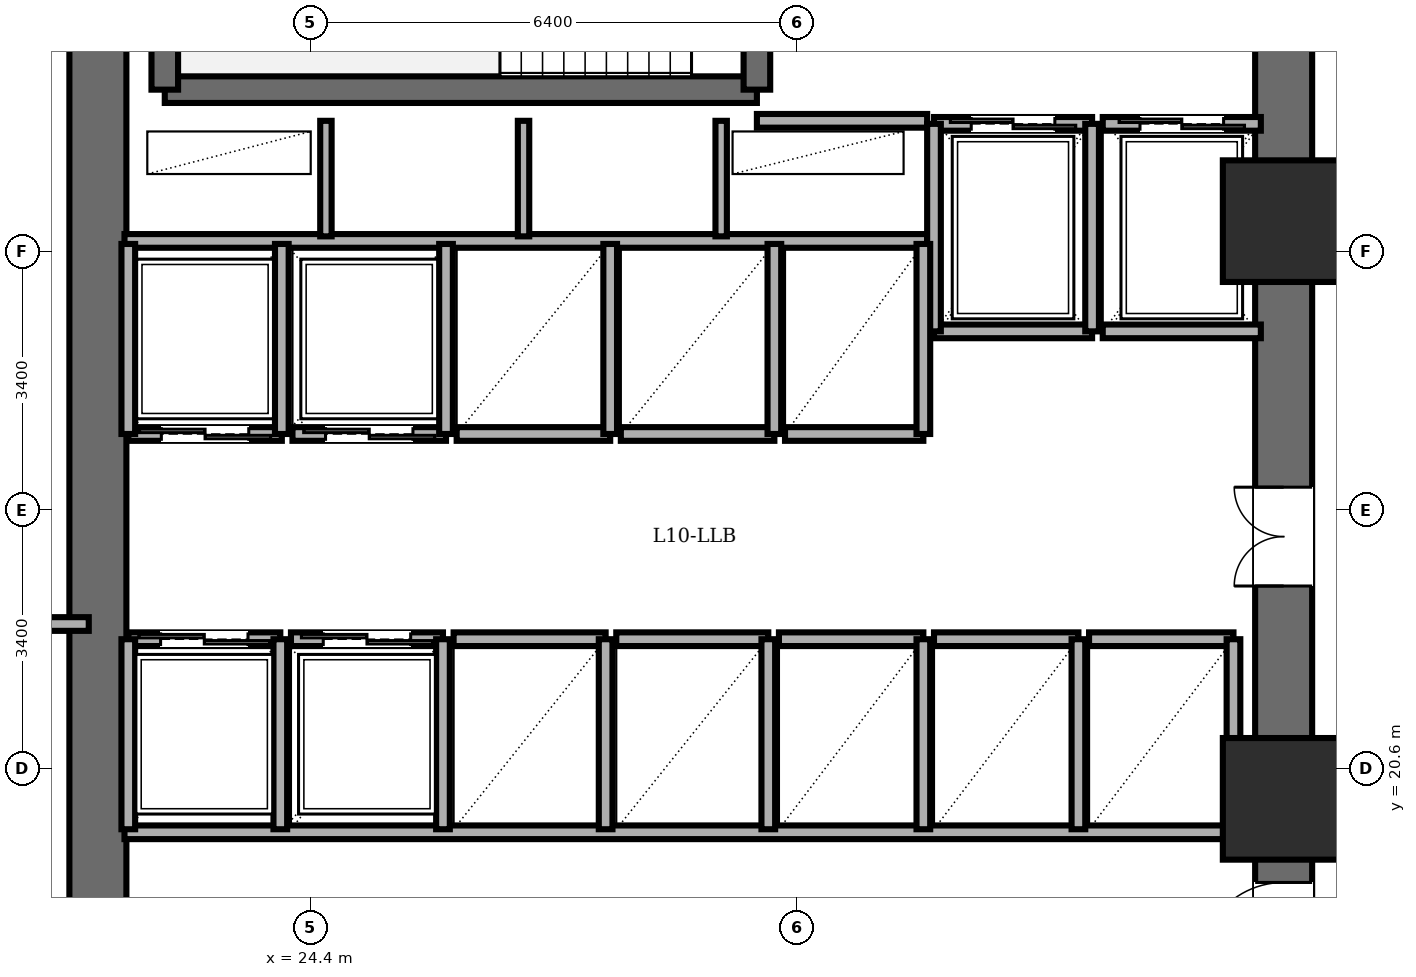
"""IFC4 building model, lengths in metres.
Left out: names, types, materials, properties, quantities, classifications, styles, units other than length and angle.
Written with IfcOpenShell. Run it as: python <this file> out.ifc"""

import sys

from ifc_helpers import new_model, si_unit, direction, frame, frame_2d, origin, origin_2d, place, context, subcontext, project, spatial, rectangle, extrude, element, fill, save


model = new_model("IFC4")
c1 = context("Model", 3, precision=1e-05, world=origin(), true_north=direction((0.0, 1.0)))
c2 = subcontext(c1, "Body", "Model", "MODEL_VIEW")
j1 = project(units=[si_unit("LENGTHUNIT", "METRE"), si_unit("PLANEANGLEUNIT", "RADIAN")], contexts=[c1])
p1 = place(None, origin())
s1 = spatial("IfcSite", under=j1, at=p1, CompositionType="ELEMENT")
p2 = place(p1, origin())
s2 = spatial("IfcBuilding", under=s1, at=p2, CompositionType="ELEMENT")
p3 = place(p2, frame((0.0, 0.0, 39.6)))
s3 = spatial("IfcBuildingStorey", under=s2, at=p3, CompositionType="ELEMENT", Elevation=39.6)
for number, where, z_axis, x_axis in (
    (1, (37.2, 20.2, 0.0), (0.0, 0.0, 1.0), (1.0, 0.0, 0.0)),
    (2, (37.2, 27.8, 0.0), (0.0, 0.0, 1.0), (1.0, 0.0, 0.0)),
):
    element("IfcColumn", number, at=place(p3, frame(where, z_axis=z_axis, x_axis=x_axis)), inside=s3, PredefinedType="COLUMN", context=c2, shape_type="SweptSolid", body=[
        extrude(rectangle(XDim=1.6, YDim=1.6, at=origin_2d()), origin(), (0.0, 0.0, 1.0), 3.6),
    ])
p4 = place(p3, frame((21.6, 14.4, 0.0), z_axis=(0.0, 0.0, 1.0), x_axis=(0.0, 1.0, 0.0)))
e3 = element("IfcWall", 3, at=p4, inside=s3, PredefinedType="SHEAR", context=c2, shape_type="SweptSolid", body=[
    extrude(rectangle(XDim=19.2, YDim=0.75, at=frame_2d((9.6, 0.0))), origin(), (0.0, 0.0, 1.0), 3.4),
])
p5 = place(p3, frame((37.2, 14.4, 0.0), z_axis=(0.0, 0.0, 1.0), x_axis=(0.0, 1.0, 0.0)))
e4 = element("IfcWall", 4, at=p5, inside=s3, PredefinedType="SHEAR", context=c2, shape_type="SweptSolid", body=[
    extrude(rectangle(XDim=19.2, YDim=0.75, at=frame_2d((9.6, 0.0))), origin(), (0.0, 0.0, 1.0), 3.4),
])
p6 = place(p5, frame((15.8, 0.0, 0.0)))
e5 = element("IfcOpeningElement", 5, at=p6, cuts=e4, PredefinedType="OPENING", context=c2, shape_type="SweptSolid", body=[
    extrude(rectangle(XDim=1.15, YDim=2.15, at=frame_2d((0.575, 1.075))), frame((0.0, 0.385, 0.0), z_axis=(0.0, -1.0, 0.0), x_axis=(1.0, 0.0, 0.0)), (0.0, 0.0, 1.0), 0.77),
])
p7 = place(p5, frame((3.6, 0.0, 0.0)))
e6 = element("IfcOpeningElement", 6, at=p7, cuts=e4, PredefinedType="OPENING", context=c2, shape_type="SweptSolid", body=[
    extrude(rectangle(XDim=1.1, YDim=2.15, at=frame_2d((0.55, 1.075))), frame((0.0, 0.385, 0.0), z_axis=(0.0, -1.0, 0.0), x_axis=(1.0, 0.0, 0.0)), (0.0, 0.0, 1.0), 0.77),
])
p8 = place(p5, frame((8.6, 0.0, 0.0)))
e7 = element("IfcOpeningElement", 7, at=p8, cuts=e4, PredefinedType="OPENING", context=c2, shape_type="SweptSolid", body=[
    extrude(rectangle(XDim=1.3, YDim=2.2, at=frame_2d((0.65, 1.1))), frame((0.0, 0.385, 0.0), z_axis=(0.0, -1.0, 0.0), x_axis=(1.0, 0.0, 0.0)), (0.0, 0.0, 1.0), 0.77),
])
p9 = place(p3, frame((22.48, 29.53, 0.0), z_axis=(0.0, 0.0, 1.0), x_axis=(1.0, 0.0, 0.0)))
e8 = element("IfcWall", 8, at=p9, inside=s3, PredefinedType="SOLIDWALL", context=c2, shape_type="SweptSolid", body=[
    extrude(rectangle(XDim=7.79, YDim=0.35, at=frame_2d((3.895, 0.0))), origin(), (0.0, 0.0, 1.0), 3.4),
])
p10 = place(p3, frame((22.48, 29.53, 0.0), z_axis=(0.0, 0.0, 1.0), x_axis=(0.0, 1.0, 0.0)))
e9 = element("IfcWall", 9, at=p10, inside=s3, PredefinedType="SOLIDWALL", context=c2, shape_type="SweptSolid", body=[
    extrude(rectangle(XDim=3.58, YDim=0.35, at=frame_2d((1.79, 0.0))), origin(), (0.0, 0.0, 1.0), 3.4),
])
p11 = place(p3, frame((30.27, 29.53, 0.0), z_axis=(0.0, 0.0, 1.0), x_axis=(0.0, 1.0, 0.0)))
e10 = element("IfcWall", 10, at=p11, inside=s3, PredefinedType="SOLIDWALL", context=c2, shape_type="SweptSolid", body=[
    extrude(rectangle(XDim=3.58, YDim=0.35, at=frame_2d((1.79, 0.0))), origin(), (0.0, 0.0, 1.0), 3.4),
])
p12 = place(p11, frame((1.25, 0.0, 0.0)))
e11 = element("IfcOpeningElement", 11, at=p12, cuts=e10, PredefinedType="OPENING", context=c2, shape_type="SweptSolid", body=[
    extrude(rectangle(XDim=1.1, YDim=2.15, at=frame_2d((0.55, 1.075))), frame((0.0, 0.185, 0.0), z_axis=(0.0, -1.0, 0.0), x_axis=(1.0, 0.0, 0.0)), (0.0, 0.0, 1.0), 0.37),
])
p13 = place(p3, frame((30.27, 29.12, 0.0), z_axis=(0.0, 0.0, 1.0), x_axis=(1.0, 0.0, 0.0)))
e12 = element("IfcWall", 12, at=p13, inside=s3, PredefinedType="PARTITIONING", context=c2, shape_type="SweptSolid", body=[
    extrude(rectangle(XDim=2.24, YDim=0.18, at=frame_2d((1.12, 0.0))), origin(), (0.0, 0.0, 1.0), 3.4),
])
p14 = place(p3, frame((21.95, 27.54, 0.0), z_axis=(0.0, 0.0, 1.0), x_axis=(1.0, 0.0, 0.0)))
e13 = element("IfcWall", 13, at=p14, inside=s3, PredefinedType="PARTITIONING", context=c2, shape_type="SweptSolid", body=[
    extrude(rectangle(XDim=10.56, YDim=0.18, at=frame_2d((5.28, 0.0))), origin(), (0.0, 0.0, 1.0), 3.4),
])
for number, where, z_axis, x_axis in (
    (14, (24.6, 27.6, 0.0), (0.0, 0.0, 1.0), (0.0, 1.0, 0.0)),
    (15, (27.2, 27.6, 0.0), (0.0, 0.0, 1.0), (0.0, 1.0, 0.0)),
    (16, (29.8, 27.6, 0.0), (0.0, 0.0, 1.0), (0.0, 1.0, 0.0)),
):
    element("IfcWall", number, at=place(p3, frame(where, z_axis=z_axis, x_axis=x_axis)), inside=s3, PredefinedType="PARTITIONING", context=c2, shape_type="SweptSolid", body=[
        extrude(rectangle(XDim=1.52, YDim=0.15, at=frame_2d((0.76, 0.0))), origin(), (0.0, 0.0, 1.0), 3.4),
    ])
p15 = place(p3, frame((21.95, 19.76, 0.0), z_axis=(0.0, 0.0, 1.0), x_axis=(1.0, 0.0, 0.0)))
e17 = element("IfcWall", 17, at=p15, inside=s3, PredefinedType="PARTITIONING", context=c2, shape_type="SweptSolid", body=[
    extrude(rectangle(XDim=14.87, YDim=0.18, at=frame_2d((7.435, 0.0))), origin(), (0.0, 0.0, 1.0), 3.4),
])
p16 = place(p3, frame((32.6, 29.08, 0.0), z_axis=(0.0, 0.0, 1.0), x_axis=(1.0, 0.0, 0.0)))
e18 = element("IfcWall", 18, at=p16, inside=s3, PredefinedType="PARTITIONING", context=c2, shape_type="SweptSolid", body=[
    extrude(rectangle(XDim=2.08, YDim=0.18, at=frame_2d((1.04, 0.0))), origin(), (0.0, 0.0, 1.0), 3.4),
])
p17 = place(p16, frame((0.49, 0.0, 0.0)))
e19 = element("IfcOpeningElement", 19, at=p17, cuts=e18, PredefinedType="OPENING", context=c2, shape_type="SweptSolid", body=[
    extrude(rectangle(XDim=1.1, YDim=2.2, at=frame_2d((0.55, 1.1))), frame((0.0, 0.1, 0.0), z_axis=(0.0, -1.0, 0.0), x_axis=(1.0, 0.0, 0.0)), (0.0, 0.0, 1.0), 0.2),
])
p18 = place(p3, frame((34.68, 26.35, 0.0), z_axis=(0.0, 0.0, 1.0), x_axis=(-1.0, 0.0, 0.0)))
e20 = element("IfcWall", 20, at=p18, inside=s3, PredefinedType="PARTITIONING", context=c2, shape_type="SweptSolid", body=[
    extrude(rectangle(XDim=2.08, YDim=0.18, at=frame_2d((1.04, 0.0))), origin(), (0.0, 0.0, 1.0), 3.4),
])
for number, where, z_axis, x_axis in (
    (21, (34.68, 26.35, 0.0), (0.0, 0.0, 1.0), (0.0, 1.0, 0.0)),
    (22, (32.6, 29.08, 0.0), (0.0, 0.0, 1.0), (0.0, -1.0, 0.0)),
):
    element("IfcWall", number, at=place(p3, frame(where, z_axis=z_axis, x_axis=x_axis)), inside=s3, PredefinedType="PARTITIONING", context=c2, shape_type="SweptSolid", body=[
        extrude(rectangle(XDim=2.73, YDim=0.18, at=frame_2d((1.365, 0.0))), origin(), (0.0, 0.0, 1.0), 3.4),
    ])
p19 = place(p3, frame((34.82, 29.08, 0.0), z_axis=(0.0, 0.0, 1.0), x_axis=(1.0, 0.0, 0.0)))
e23 = element("IfcWall", 23, at=p19, inside=s3, PredefinedType="PARTITIONING", context=c2, shape_type="SweptSolid", body=[
    extrude(rectangle(XDim=2.08, YDim=0.18, at=frame_2d((1.04, 0.0))), origin(), (0.0, 0.0, 1.0), 3.4),
])
p20 = place(p19, frame((0.49, 0.0, 0.0)))
e24 = element("IfcOpeningElement", 24, at=p20, cuts=e23, PredefinedType="OPENING", context=c2, shape_type="SweptSolid", body=[
    extrude(rectangle(XDim=1.1, YDim=2.2, at=frame_2d((0.55, 1.1))), frame((0.0, 0.1, 0.0), z_axis=(0.0, -1.0, 0.0), x_axis=(1.0, 0.0, 0.0)), (0.0, 0.0, 1.0), 0.2),
])
p21 = place(p3, frame((36.9, 26.35, 0.0), z_axis=(0.0, 0.0, 1.0), x_axis=(-1.0, 0.0, 0.0)))
e25 = element("IfcWall", 25, at=p21, inside=s3, PredefinedType="PARTITIONING", context=c2, shape_type="SweptSolid", body=[
    extrude(rectangle(XDim=2.08, YDim=0.18, at=frame_2d((1.04, 0.0))), origin(), (0.0, 0.0, 1.0), 3.4),
])
p22 = place(p3, frame((24.02, 25.0, 0.0), z_axis=(0.0, 0.0, 1.0), x_axis=(-1.0, 0.0, 0.0)))
e26 = element("IfcWall", 26, at=p22, inside=s3, PredefinedType="PARTITIONING", context=c2, shape_type="SweptSolid", body=[
    extrude(rectangle(XDim=2.02, YDim=0.18, at=frame_2d((1.01, 0.0))), origin(), (0.0, 0.0, 1.0), 3.4),
])
p23 = place(p22, frame((0.435, 0.0, 0.0)))
e27 = element("IfcOpeningElement", 27, at=p23, cuts=e26, PredefinedType="OPENING", context=c2, shape_type="SweptSolid", body=[
    extrude(rectangle(XDim=1.15, YDim=2.2, at=frame_2d((0.575, 1.1))), frame((0.0, 0.1, 0.0), z_axis=(0.0, -1.0, 0.0), x_axis=(1.0, 0.0, 0.0)), (0.0, 0.0, 1.0), 0.2),
])
for number, where, z_axis, x_axis in (
    (28, (24.02, 25.0, 0.0), (0.0, 0.0, 1.0), (0.0, 1.0, 0.0)),
    (29, (22.0, 27.5, 0.0), (0.0, 0.0, 1.0), (0.0, -1.0, 0.0)),
):
    element("IfcWall", number, at=place(p3, frame(where, z_axis=z_axis, x_axis=x_axis)), inside=s3, PredefinedType="PARTITIONING", context=c2, shape_type="SweptSolid", body=[
        extrude(rectangle(XDim=2.5, YDim=0.18, at=frame_2d((1.25, 0.0))), origin(), (0.0, 0.0, 1.0), 3.4),
    ])
p24 = place(p3, frame((26.18, 25.0, 0.0), z_axis=(0.0, 0.0, 1.0), x_axis=(-1.0, 0.0, 0.0)))
e30 = element("IfcWall", 30, at=p24, inside=s3, PredefinedType="PARTITIONING", context=c2, shape_type="SweptSolid", body=[
    extrude(rectangle(XDim=2.02, YDim=0.18, at=frame_2d((1.01, 0.0))), origin(), (0.0, 0.0, 1.0), 3.4),
])
p25 = place(p24, frame((0.435, 0.0, 0.0)))
e31 = element("IfcOpeningElement", 31, at=p25, cuts=e30, PredefinedType="OPENING", context=c2, shape_type="SweptSolid", body=[
    extrude(rectangle(XDim=1.15, YDim=2.2, at=frame_2d((0.575, 1.1))), frame((0.0, 0.1, 0.0), z_axis=(0.0, -1.0, 0.0), x_axis=(1.0, 0.0, 0.0)), (0.0, 0.0, 1.0), 0.2),
])
p26 = place(p3, frame((26.18, 25.0, 0.0), z_axis=(0.0, 0.0, 1.0), x_axis=(0.0, 1.0, 0.0)))
e32 = element("IfcWall", 32, at=p26, inside=s3, PredefinedType="PARTITIONING", context=c2, shape_type="SweptSolid", body=[
    extrude(rectangle(XDim=2.5, YDim=0.18, at=frame_2d((1.25, 0.0))), origin(), (0.0, 0.0, 1.0), 3.4),
])
p27 = place(p3, frame((22.0, 22.3, 0.0), z_axis=(0.0, 0.0, 1.0), x_axis=(1.0, 0.0, 0.0)))
e33 = element("IfcWall", 33, at=p27, inside=s3, PredefinedType="PARTITIONING", context=c2, shape_type="SweptSolid", body=[
    extrude(rectangle(XDim=2.0, YDim=0.18, at=frame_2d((1.0, 0.0))), origin(), (0.0, 0.0, 1.0), 3.4),
])
p28 = place(p27, frame((0.425, 0.0, 0.0)))
e34 = element("IfcOpeningElement", 34, at=p28, cuts=e33, PredefinedType="OPENING", context=c2, shape_type="SweptSolid", body=[
    extrude(rectangle(XDim=1.15, YDim=2.2, at=frame_2d((0.575, 1.1))), frame((0.0, 0.1, 0.0), z_axis=(0.0, -1.0, 0.0), x_axis=(1.0, 0.0, 0.0)), (0.0, 0.0, 1.0), 0.2),
])
for number, where, z_axis, x_axis in (
    (35, (24.0, 19.8, 0.0), (0.0, 0.0, 1.0), (0.0, 1.0, 0.0)),
    (36, (22.0, 22.3, 0.0), (0.0, 0.0, 1.0), (0.0, -1.0, 0.0)),
):
    element("IfcWall", number, at=place(p3, frame(where, z_axis=z_axis, x_axis=x_axis)), inside=s3, PredefinedType="PARTITIONING", context=c2, shape_type="SweptSolid", body=[
        extrude(rectangle(XDim=2.5, YDim=0.18, at=frame_2d((1.25, 0.0))), origin(), (0.0, 0.0, 1.0), 3.4),
    ])
p29 = place(p3, frame((24.14, 22.3, 0.0), z_axis=(0.0, 0.0, 1.0), x_axis=(1.0, 0.0, 0.0)))
e37 = element("IfcWall", 37, at=p29, inside=s3, PredefinedType="PARTITIONING", context=c2, shape_type="SweptSolid", body=[
    extrude(rectangle(XDim=2.0, YDim=0.18, at=frame_2d((1.0, 0.0))), origin(), (0.0, 0.0, 1.0), 3.4),
])
p30 = place(p29, frame((0.425, 0.0, 0.0)))
e38 = element("IfcOpeningElement", 38, at=p30, cuts=e37, PredefinedType="OPENING", context=c2, shape_type="SweptSolid", body=[
    extrude(rectangle(XDim=1.15, YDim=2.2, at=frame_2d((0.575, 1.1))), frame((0.0, 0.1, 0.0), z_axis=(0.0, -1.0, 0.0), x_axis=(1.0, 0.0, 0.0)), (0.0, 0.0, 1.0), 0.2),
])
p31 = place(p3, frame((26.14, 19.8, 0.0), z_axis=(0.0, 0.0, 1.0), x_axis=(0.0, 1.0, 0.0)))
e39 = element("IfcWall", 39, at=p31, inside=s3, PredefinedType="PARTITIONING", context=c2, shape_type="SweptSolid", body=[
    extrude(rectangle(XDim=2.5, YDim=0.18, at=frame_2d((1.25, 0.0))), origin(), (0.0, 0.0, 1.0), 3.4),
])
p32 = place(p3, frame((28.34, 25.0, 0.0), z_axis=(0.0, 0.0, 1.0), x_axis=(-1.0, 0.0, 0.0)))
e40 = element("IfcWall", 40, at=p32, inside=s3, PredefinedType="PARTITIONING", context=c2, shape_type="SweptSolid", body=[
    extrude(rectangle(XDim=2.02, YDim=0.18, at=frame_2d((1.01, 0.0))), origin(), (0.0, 0.0, 1.0), 3.4),
])
p33 = place(p3, frame((28.34, 25.0, 0.0), z_axis=(0.0, 0.0, 1.0), x_axis=(0.0, 1.0, 0.0)))
e41 = element("IfcWall", 41, at=p33, inside=s3, PredefinedType="PARTITIONING", context=c2, shape_type="SweptSolid", body=[
    extrude(rectangle(XDim=2.5, YDim=0.18, at=frame_2d((1.25, 0.0))), origin(), (0.0, 0.0, 1.0), 3.4),
])
p34 = place(p3, frame((30.5, 25.0, 0.0), z_axis=(0.0, 0.0, 1.0), x_axis=(-1.0, 0.0, 0.0)))
e42 = element("IfcWall", 42, at=p34, inside=s3, PredefinedType="PARTITIONING", context=c2, shape_type="SweptSolid", body=[
    extrude(rectangle(XDim=2.02, YDim=0.18, at=frame_2d((1.01, 0.0))), origin(), (0.0, 0.0, 1.0), 3.4),
])
p35 = place(p3, frame((30.5, 25.0, 0.0), z_axis=(0.0, 0.0, 1.0), x_axis=(0.0, 1.0, 0.0)))
e43 = element("IfcWall", 43, at=p35, inside=s3, PredefinedType="PARTITIONING", context=c2, shape_type="SweptSolid", body=[
    extrude(rectangle(XDim=2.5, YDim=0.18, at=frame_2d((1.25, 0.0))), origin(), (0.0, 0.0, 1.0), 3.4),
])
p36 = place(p3, frame((26.28, 22.3, 0.0), z_axis=(0.0, 0.0, 1.0), x_axis=(1.0, 0.0, 0.0)))
e44 = element("IfcWall", 44, at=p36, inside=s3, PredefinedType="PARTITIONING", context=c2, shape_type="SweptSolid", body=[
    extrude(rectangle(XDim=2.0, YDim=0.18, at=frame_2d((1.0, 0.0))), origin(), (0.0, 0.0, 1.0), 3.4),
])
p37 = place(p3, frame((28.28, 19.8, 0.0), z_axis=(0.0, 0.0, 1.0), x_axis=(0.0, 1.0, 0.0)))
e45 = element("IfcWall", 45, at=p37, inside=s3, PredefinedType="PARTITIONING", context=c2, shape_type="SweptSolid", body=[
    extrude(rectangle(XDim=2.5, YDim=0.18, at=frame_2d((1.25, 0.0))), origin(), (0.0, 0.0, 1.0), 3.4),
])
p38 = place(p3, frame((28.42, 22.3, 0.0), z_axis=(0.0, 0.0, 1.0), x_axis=(1.0, 0.0, 0.0)))
e46 = element("IfcWall", 46, at=p38, inside=s3, PredefinedType="PARTITIONING", context=c2, shape_type="SweptSolid", body=[
    extrude(rectangle(XDim=2.0, YDim=0.18, at=frame_2d((1.0, 0.0))), origin(), (0.0, 0.0, 1.0), 3.4),
])
p39 = place(p3, frame((30.42, 19.8, 0.0), z_axis=(0.0, 0.0, 1.0), x_axis=(0.0, 1.0, 0.0)))
e47 = element("IfcWall", 47, at=p39, inside=s3, PredefinedType="PARTITIONING", context=c2, shape_type="SweptSolid", body=[
    extrude(rectangle(XDim=2.5, YDim=0.18, at=frame_2d((1.25, 0.0))), origin(), (0.0, 0.0, 1.0), 3.4),
])
p40 = place(p3, frame((32.46, 25.0, 0.0), z_axis=(0.0, 0.0, 1.0), x_axis=(-1.0, 0.0, 0.0)))
e48 = element("IfcWall", 48, at=p40, inside=s3, PredefinedType="PARTITIONING", context=c2, shape_type="SweptSolid", body=[
    extrude(rectangle(XDim=1.82, YDim=0.18, at=frame_2d((0.91, 0.0))), origin(), (0.0, 0.0, 1.0), 3.4),
])
p41 = place(p3, frame((32.46, 25.0, 0.0), z_axis=(0.0, 0.0, 1.0), x_axis=(0.0, 1.0, 0.0)))
e49 = element("IfcWall", 49, at=p41, inside=s3, PredefinedType="PARTITIONING", context=c2, shape_type="SweptSolid", body=[
    extrude(rectangle(XDim=2.5, YDim=0.18, at=frame_2d((1.25, 0.0))), origin(), (0.0, 0.0, 1.0), 3.4),
])
p42 = place(p3, frame((30.56, 22.3, 0.0), z_axis=(0.0, 0.0, 1.0), x_axis=(1.0, 0.0, 0.0)))
e50 = element("IfcWall", 50, at=p42, inside=s3, PredefinedType="PARTITIONING", context=c2, shape_type="SweptSolid", body=[
    extrude(rectangle(XDim=1.9, YDim=0.18, at=frame_2d((0.95, 0.0))), origin(), (0.0, 0.0, 1.0), 3.4),
])
p43 = place(p3, frame((32.46, 19.8, 0.0), z_axis=(0.0, 0.0, 1.0), x_axis=(0.0, 1.0, 0.0)))
e51 = element("IfcWall", 51, at=p43, inside=s3, PredefinedType="PARTITIONING", context=c2, shape_type="SweptSolid", body=[
    extrude(rectangle(XDim=2.5, YDim=0.18, at=frame_2d((1.25, 0.0))), origin(), (0.0, 0.0, 1.0), 3.4),
])
p44 = place(p3, frame((32.6, 22.3, 0.0), z_axis=(0.0, 0.0, 1.0), x_axis=(1.0, 0.0, 0.0)))
e52 = element("IfcWall", 52, at=p44, inside=s3, PredefinedType="PARTITIONING", context=c2, shape_type="SweptSolid", body=[
    extrude(rectangle(XDim=1.9, YDim=0.18, at=frame_2d((0.95, 0.0))), origin(), (0.0, 0.0, 1.0), 3.4),
])
p45 = place(p3, frame((34.5, 19.8, 0.0), z_axis=(0.0, 0.0, 1.0), x_axis=(0.0, 1.0, 0.0)))
e53 = element("IfcWall", 53, at=p45, inside=s3, PredefinedType="PARTITIONING", context=c2, shape_type="SweptSolid", body=[
    extrude(rectangle(XDim=2.5, YDim=0.18, at=frame_2d((1.25, 0.0))), origin(), (0.0, 0.0, 1.0), 3.4),
])
p46 = place(p3, frame((34.64, 22.3, 0.0), z_axis=(0.0, 0.0, 1.0), x_axis=(1.0, 0.0, 0.0)))
e54 = element("IfcWall", 54, at=p46, inside=s3, PredefinedType="PARTITIONING", context=c2, shape_type="SweptSolid", body=[
    extrude(rectangle(XDim=1.9, YDim=0.18, at=frame_2d((0.95, 0.0))), origin(), (0.0, 0.0, 1.0), 3.4),
])
p47 = place(p3, frame((36.54, 19.8, 0.0), z_axis=(0.0, 0.0, 1.0), x_axis=(0.0, 1.0, 0.0)))
e55 = element("IfcWall", 55, at=p47, inside=s3, PredefinedType="PARTITIONING", context=c2, shape_type="SweptSolid", body=[
    extrude(rectangle(XDim=2.5, YDim=0.18, at=frame_2d((1.25, 0.0))), origin(), (0.0, 0.0, 1.0), 3.4),
])
p48 = place(p3, frame((3.4, 22.5, 0.0), z_axis=(0.0, 0.0, 1.0), x_axis=(1.0, 0.0, 0.0)))
e56 = element("IfcWall", 56, at=p48, inside=s3, PredefinedType="PARTITIONING", context=c2, shape_type="SweptSolid", body=[
    extrude(rectangle(XDim=18.08, YDim=0.18, at=frame_2d((9.04, 0.0))), origin(), (0.0, 0.0, 1.0), 3.4),
])
p49 = place(p7, origin())
e57 = element("IfcDoor", 57, at=p49, inside=s3, OperationType="SINGLE_SWING_LEFT", PredefinedType="DOOR", context=c2, shape_type="SweptSolid", body=[
    extrude(rectangle(XDim=1.1, YDim=2.15, at=frame_2d((0.55, 1.075))), frame((0.0, 0.025, 0.0), z_axis=(0.0, -1.0, 0.0), x_axis=(1.0, 0.0, 0.0)), (0.0, 0.0, 1.0), 0.05),
])
fill(e6, e57)
p50 = place(p17, origin())
e58 = element("IfcDoor", 58, at=p50, inside=s3, OperationType="DOUBLE_DOOR_SLIDING", PredefinedType="DOOR", context=c2, shape_type="SweptSolid", body=[
    extrude(rectangle(XDim=1.1, YDim=2.2, at=frame_2d((0.55, 1.1))), frame((0.0, 0.025, 0.0), z_axis=(0.0, -1.0, 0.0), x_axis=(1.0, 0.0, 0.0)), (0.0, 0.0, 1.0), 0.05),
])
fill(e19, e58)
p51 = place(p20, origin())
e59 = element("IfcDoor", 59, at=p51, inside=s3, OperationType="DOUBLE_DOOR_SLIDING", PredefinedType="DOOR", context=c2, shape_type="SweptSolid", body=[
    extrude(rectangle(XDim=1.1, YDim=2.2, at=frame_2d((0.55, 1.1))), frame((0.0, 0.025, 0.0), z_axis=(0.0, -1.0, 0.0), x_axis=(1.0, 0.0, 0.0)), (0.0, 0.0, 1.0), 0.05),
])
fill(e24, e59)
p52 = place(p23, origin())
e60 = element("IfcDoor", 60, at=p52, inside=s3, OperationType="DOUBLE_DOOR_SLIDING", PredefinedType="DOOR", context=c2, shape_type="SweptSolid", body=[
    extrude(rectangle(XDim=1.15, YDim=2.2, at=frame_2d((0.575, 1.1))), frame((0.0, 0.025, 0.0), z_axis=(0.0, -1.0, 0.0), x_axis=(1.0, 0.0, 0.0)), (0.0, 0.0, 1.0), 0.05),
])
fill(e27, e60)
p53 = place(p25, origin())
e61 = element("IfcDoor", 61, at=p53, inside=s3, OperationType="DOUBLE_DOOR_SLIDING", PredefinedType="DOOR", context=c2, shape_type="SweptSolid", body=[
    extrude(rectangle(XDim=1.15, YDim=2.2, at=frame_2d((0.575, 1.1))), frame((0.0, 0.025, 0.0), z_axis=(0.0, -1.0, 0.0), x_axis=(1.0, 0.0, 0.0)), (0.0, 0.0, 1.0), 0.05),
])
fill(e31, e61)
p54 = place(p28, origin())
e62 = element("IfcDoor", 62, at=p54, inside=s3, OperationType="DOUBLE_DOOR_SLIDING", PredefinedType="DOOR", context=c2, shape_type="SweptSolid", body=[
    extrude(rectangle(XDim=1.15, YDim=2.2, at=frame_2d((0.575, 1.1))), frame((0.0, 0.025, 0.0), z_axis=(0.0, -1.0, 0.0), x_axis=(1.0, 0.0, 0.0)), (0.0, 0.0, 1.0), 0.05),
])
fill(e34, e62)
p55 = place(p30, origin())
e63 = element("IfcDoor", 63, at=p55, inside=s3, OperationType="DOUBLE_DOOR_SLIDING", PredefinedType="DOOR", context=c2, shape_type="SweptSolid", body=[
    extrude(rectangle(XDim=1.15, YDim=2.2, at=frame_2d((0.575, 1.1))), frame((0.0, 0.025, 0.0), z_axis=(0.0, -1.0, 0.0), x_axis=(1.0, 0.0, 0.0)), (0.0, 0.0, 1.0), 0.05),
])
fill(e38, e63)
p56 = place(p8, origin())
e64 = element("IfcDoor", 64, at=p56, inside=s3, OperationType="DOUBLE_DOOR_SINGLE_SWING", PredefinedType="DOOR", context=c2, shape_type="SweptSolid", body=[
    extrude(rectangle(XDim=1.3, YDim=2.2, at=frame_2d((0.65, 1.1))), frame((0.0, 0.025, 0.0), z_axis=(0.0, -1.0, 0.0), x_axis=(1.0, 0.0, 0.0)), (0.0, 0.0, 1.0), 0.05),
])
fill(e7, e64)
save(model, sys.argv[1])
